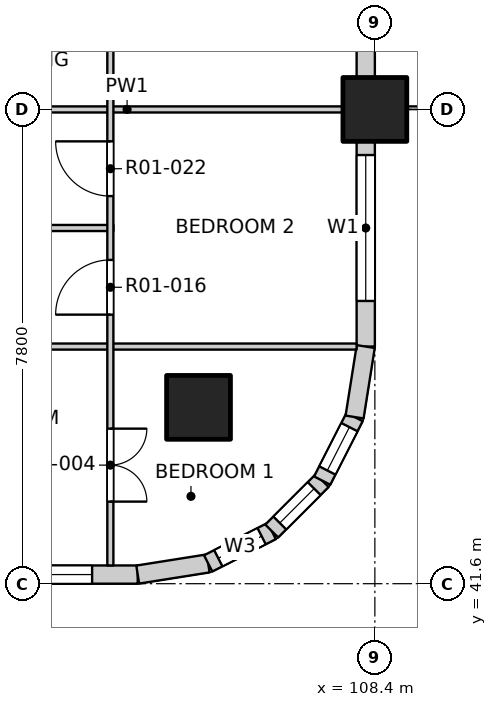
"""IFC4 building model, lengths in metres.
Left out: names, types, materials, properties, quantities, classifications, styles, units other than length and angle.
Written with IfcOpenShell. Run it as: python <this file> out.ifc"""

import sys

from ifc_helpers import new_model, si_unit, direction, frame, frame_2d, origin, origin_2d, place, context, subcontext, project, spatial, rectangle, extrude, element, fill, save


model = new_model("IFC4")
c1 = context("Model", 3, precision=1e-05, world=origin(), true_north=direction((0.0, 1.0)))
c2 = subcontext(c1, "Body", "Model", "MODEL_VIEW")
j1 = project(units=[si_unit("LENGTHUNIT", "METRE"), si_unit("PLANEANGLEUNIT", "RADIAN")], contexts=[c1])
p1 = place(None, origin())
s1 = spatial("IfcSite", under=j1, at=p1, CompositionType="ELEMENT")
p2 = place(p1, origin())
s2 = spatial("IfcBuilding", under=s1, at=p2, CompositionType="ELEMENT")
p3 = place(p2, frame((0.0, 0.0, 26.3)))
s3 = spatial("IfcBuildingStorey", under=s2, at=p3, CompositionType="ELEMENT", Elevation=26.3)
for number, where, z_axis, x_axis in (
    (1, (105.5, 44.5, -0.25), (0.0, 0.0, 1.0), (1.0, 0.0, 0.0)),
    (2, (108.4, 49.4, -0.25), (0.0, 0.0, 1.0), (1.0, 0.0, 0.0)),
):
    element("IfcColumn", number, at=place(p3, frame(where, z_axis=z_axis, x_axis=x_axis)), inside=s3, PredefinedType="COLUMN", context=c2, shape_type="SweptSolid", body=[
        extrude(rectangle(XDim=1.05, YDim=1.05, at=origin_2d()), origin(), (0.0, 0.0, 1.0), 3.4),
    ])
p4 = place(p3, frame((101.125, 41.75, 0.0), z_axis=(0.0, 0.0, 1.0), x_axis=(1.0, 0.0, 0.0)))
e3 = element("IfcWall", 3, at=p4, inside=s3, PredefinedType="SOLIDWALL", context=c2, shape_type="SweptSolid", body=[
    extrude(rectangle(XDim=3.375, YDim=0.3, at=frame_2d((1.688, 0.0))), origin(), (0.0, 0.0, 1.0), 2.7),
])
p5 = place(p4, frame((0.225, 0.0, 0.9)))
e4 = element("IfcOpeningElement", 4, at=p5, cuts=e3, PredefinedType="OPENING", context=c2, shape_type="SweptSolid", body=[
    extrude(rectangle(XDim=2.4, YDim=1.8, at=frame_2d((1.2, 0.9))), frame((0.0, 0.16, 0.0), z_axis=(0.0, -1.0, 0.0), x_axis=(1.0, 0.0, 0.0)), (0.0, 0.0, 1.0), 0.32),
])
p6 = place(p3, frame((108.25, 45.5, 0.0), z_axis=(0.0, 0.0, 1.0), x_axis=(0.0, 1.0, 0.0)))
e5 = element("IfcWall", 5, at=p6, inside=s3, PredefinedType="SOLIDWALL", context=c2, shape_type="SweptSolid", body=[
    extrude(rectangle(XDim=3.375, YDim=0.3, at=frame_2d((1.688, 0.0))), origin(), (0.0, 0.0, 1.0), 2.7),
])
p7 = place(p6, frame((0.75, 0.0, 0.9)))
e6 = element("IfcOpeningElement", 6, at=p7, cuts=e5, PredefinedType="OPENING", context=c2, shape_type="SweptSolid", body=[
    extrude(rectangle(XDim=2.4, YDim=1.8, at=frame_2d((1.2, 0.9))), frame((0.0, 0.16, 0.0), z_axis=(0.0, -1.0, 0.0), x_axis=(1.0, 0.0, 0.0)), (0.0, 0.0, 1.0), 0.32),
])
p8 = place(p3, frame((108.25, 49.925, 0.0), z_axis=(0.0, 0.0, 1.0), x_axis=(0.0, 1.0, 0.0)))
e7 = element("IfcWall", 7, at=p8, inside=s3, PredefinedType="SOLIDWALL", context=c2, shape_type="SweptSolid", body=[
    extrude(rectangle(XDim=6.75, YDim=0.3, at=frame_2d((3.375, 0.0))), origin(), (0.0, 0.0, 1.0), 2.7),
])
p9 = place(p8, frame((0.525, 0.0, 0.0)))
e8 = element("IfcOpeningElement", 8, at=p9, cuts=e7, PredefinedType="OPENING", context=c2, shape_type="SweptSolid", body=[
    extrude(rectangle(XDim=1.8, YDim=2.4, at=frame_2d((0.9, 1.2))), frame((0.0, 0.16, 0.0), z_axis=(0.0, -1.0, 0.0), x_axis=(1.0, 0.0, 0.0)), (0.0, 0.0, 1.0), 0.32),
])
p10 = place(p8, frame((4.125, 0.0, 0.9)))
e9 = element("IfcOpeningElement", 9, at=p10, cuts=e7, PredefinedType="OPENING", context=c2, shape_type="SweptSolid", body=[
    extrude(rectangle(XDim=2.4, YDim=1.8, at=frame_2d((1.2, 0.9))), frame((0.0, 0.16, 0.0), z_axis=(0.0, -1.0, 0.0), x_axis=(1.0, 0.0, 0.0)), (0.0, 0.0, 1.0), 0.32),
])
p11 = place(p3, frame((104.5, 41.75, 0.0), z_axis=(0.0, 0.0, 1.0), x_axis=(0.987678452879, 0.156496880861, 0.0)))
e10 = element("IfcWall", 10, at=p11, inside=s3, PredefinedType="SOLIDWALL", context=c2, shape_type="SweptSolid", body=[
    extrude(rectangle(XDim=1.173, YDim=0.3, at=frame_2d((0.586, 0.0))), origin(), (0.0, 0.0, 1.0), 2.7),
])
p12 = place(p3, frame((105.659, 41.934, 0.0), z_axis=(0.0, 0.0, 1.0), x_axis=(0.890988677504, 0.454025524128, 0.0)))
e11 = element("IfcWall", 11, at=p12, inside=s3, PredefinedType="SOLIDWALL", context=c2, shape_type="SweptSolid", body=[
    extrude(rectangle(XDim=1.173, YDim=0.3, at=frame_2d((0.587, 0.0))), origin(), (0.0, 0.0, 1.0), 2.7),
])
p13 = place(p12, frame((0.187, 0.0, 0.9)))
e12 = element("IfcOpeningElement", 12, at=p13, cuts=e11, PredefinedType="OPENING", context=c2, shape_type="SweptSolid", body=[
    extrude(rectangle(XDim=0.8, YDim=1.2, at=frame_2d((0.4, 0.6))), frame((0.0, 0.16, 0.0), z_axis=(0.0, -1.0, 0.0), x_axis=(1.0, 0.0, 0.0)), (0.0, 0.0, 1.0), 0.32),
])
p14 = place(p3, frame((106.704, 42.466, 0.0), z_axis=(0.0, 0.0, 1.0), x_axis=(0.707106781187, 0.707106781187, 0.0)))
e13 = element("IfcWall", 13, at=p14, inside=s3, PredefinedType="SOLIDWALL", context=c2, shape_type="SweptSolid", body=[
    extrude(rectangle(XDim=1.173, YDim=0.3, at=frame_2d((0.586, 0.0))), origin(), (0.0, 0.0, 1.0), 2.7),
])
p15 = place(p14, frame((0.187, 0.0, 0.9)))
e14 = element("IfcOpeningElement", 14, at=p15, cuts=e13, PredefinedType="OPENING", context=c2, shape_type="SweptSolid", body=[
    extrude(rectangle(XDim=0.8, YDim=1.2, at=frame_2d((0.4, 0.6))), frame((0.0, 0.16, 0.0), z_axis=(0.0, -1.0, 0.0), x_axis=(1.0, 0.0, 0.0)), (0.0, 0.0, 1.0), 0.32),
])
p16 = place(p3, frame((107.534, 43.296, 0.0), z_axis=(0.0, 0.0, 1.0), x_axis=(0.454025524128, 0.890988677504, 0.0)))
e15 = element("IfcWall", 15, at=p16, inside=s3, PredefinedType="SOLIDWALL", context=c2, shape_type="SweptSolid", body=[
    extrude(rectangle(XDim=1.173, YDim=0.3, at=frame_2d((0.587, 0.0))), origin(), (0.0, 0.0, 1.0), 2.7),
])
p17 = place(p16, frame((0.187, 0.0, 0.9)))
e16 = element("IfcOpeningElement", 16, at=p17, cuts=e15, PredefinedType="OPENING", context=c2, shape_type="SweptSolid", body=[
    extrude(rectangle(XDim=0.8, YDim=1.2, at=frame_2d((0.4, 0.6))), frame((0.0, 0.16, 0.0), z_axis=(0.0, -1.0, 0.0), x_axis=(1.0, 0.0, 0.0)), (0.0, 0.0, 1.0), 0.32),
])
p18 = place(p3, frame((108.066, 44.341, 0.0), z_axis=(0.0, 0.0, 1.0), x_axis=(0.156496880861, 0.987678452879, 0.0)))
e17 = element("IfcWall", 17, at=p18, inside=s3, PredefinedType="SOLIDWALL", context=c2, shape_type="SweptSolid", body=[
    extrude(rectangle(XDim=1.173, YDim=0.3, at=frame_2d((0.586, 0.0))), origin(), (0.0, 0.0, 1.0), 2.7),
])
p19 = place(p3, frame((96.6, 45.5, 0.0), z_axis=(0.0, 0.0, 1.0), x_axis=(1.0, 0.0, 0.0)))
e18 = element("IfcWall", 18, at=p19, inside=s3, PredefinedType="PARTITIONING", context=c2, shape_type="SweptSolid", body=[
    extrude(rectangle(XDim=11.5, YDim=0.1, at=frame_2d((5.75, 0.0))), origin(), (0.0, 0.0, 1.0), 3.15),
])
p20 = place(p19, frame((2.635, 0.0, 0.0)))
e19 = element("IfcOpeningElement", 19, at=p20, cuts=e18, PredefinedType="OPENING", context=c2, shape_type="SweptSolid", body=[
    extrude(rectangle(XDim=0.9, YDim=2.1, at=frame_2d((0.45, 1.05))), frame((0.0, 0.06, 0.0), z_axis=(0.0, -1.0, 0.0), x_axis=(1.0, 0.0, 0.0)), (0.0, 0.0, 1.0), 0.12),
])
p21 = place(p3, frame((100.55, 47.45, 0.0), z_axis=(0.0, 0.0, 1.0), x_axis=(1.0, 0.0, 0.0)))
e20 = element("IfcWall", 20, at=p21, inside=s3, PredefinedType="PARTITIONING", context=c2, shape_type="SweptSolid", body=[
    extrude(rectangle(XDim=3.55, YDim=0.1, at=frame_2d((1.775, 0.0))), origin(), (0.0, 0.0, 1.0), 3.15),
])
p22 = place(p3, frame((100.55, 49.4, 0.0), z_axis=(0.0, 0.0, 1.0), x_axis=(1.0, 0.0, 0.0)))
e21 = element("IfcWall", 21, at=p22, inside=s3, PredefinedType="PARTITIONING", context=c2, shape_type="SweptSolid", body=[
    extrude(rectangle(XDim=7.55, YDim=0.1, at=frame_2d((3.775, 0.0))), origin(), (0.0, 0.0, 1.0), 2.55),
])
p23 = place(p3, frame((104.05, 41.9, 0.0), z_axis=(0.0, 0.0, 1.0), x_axis=(0.0, 1.0, 0.0)))
e22 = element("IfcWall", 22, at=p23, inside=s3, PredefinedType="PARTITIONING", context=c2, shape_type="SweptSolid", body=[
    extrude(rectangle(XDim=19.1, YDim=0.1, at=frame_2d((9.55, 0.0))), origin(), (0.0, 0.0, 1.0), 3.15),
])
p24 = place(p23, frame((1.05, 0.0, 0.0)))
e23 = element("IfcOpeningElement", 23, at=p24, cuts=e22, PredefinedType="OPENING", context=c2, shape_type="SweptSolid", body=[
    extrude(rectangle(XDim=1.2, YDim=2.1, at=frame_2d((0.6, 1.05))), frame((0.0, 0.06, 0.0), z_axis=(0.0, -1.0, 0.0), x_axis=(1.0, 0.0, 0.0)), (0.0, 0.0, 1.0), 0.12),
])
p25 = place(p23, frame((4.125, 0.0, 0.0)))
e24 = element("IfcOpeningElement", 24, at=p25, cuts=e22, PredefinedType="OPENING", context=c2, shape_type="SweptSolid", body=[
    extrude(rectangle(XDim=0.9, YDim=2.1, at=frame_2d((0.45, 1.05))), frame((0.0, 0.06, 0.0), z_axis=(0.0, -1.0, 0.0), x_axis=(1.0, 0.0, 0.0)), (0.0, 0.0, 1.0), 0.12),
])
p26 = place(p23, frame((6.075, 0.0, 0.0)))
e25 = element("IfcOpeningElement", 25, at=p26, cuts=e22, PredefinedType="OPENING", context=c2, shape_type="SweptSolid", body=[
    extrude(rectangle(XDim=0.9, YDim=2.1, at=frame_2d((0.45, 1.05))), frame((0.0, 0.06, 0.0), z_axis=(0.0, -1.0, 0.0), x_axis=(1.0, 0.0, 0.0)), (0.0, 0.0, 1.0), 0.12),
])
p27 = place(p23, frame((8.85, 0.0, 0.0)))
e26 = element("IfcOpeningElement", 26, at=p27, cuts=e22, PredefinedType="OPENING", context=c2, shape_type="SweptSolid", body=[
    extrude(rectangle(XDim=1.2, YDim=2.1, at=frame_2d((0.6, 1.05))), frame((0.0, 0.06, 0.0), z_axis=(0.0, -1.0, 0.0), x_axis=(1.0, 0.0, 0.0)), (0.0, 0.0, 1.0), 0.12),
])
p28 = place(p23, frame((12.75, 0.0, 0.0)))
e27 = element("IfcOpeningElement", 27, at=p28, cuts=e22, PredefinedType="OPENING", context=c2, shape_type="SweptSolid", body=[
    extrude(rectangle(XDim=1.2, YDim=2.1, at=frame_2d((0.6, 1.05))), frame((0.0, 0.06, 0.0), z_axis=(0.0, -1.0, 0.0), x_axis=(1.0, 0.0, 0.0)), (0.0, 0.0, 1.0), 0.12),
])
p29 = place(p23, frame((15.825, 0.0, 0.0)))
e28 = element("IfcOpeningElement", 28, at=p29, cuts=e22, PredefinedType="OPENING", context=c2, shape_type="SweptSolid", body=[
    extrude(rectangle(XDim=0.9, YDim=2.1, at=frame_2d((0.45, 1.05))), frame((0.0, 0.06, 0.0), z_axis=(0.0, -1.0, 0.0), x_axis=(1.0, 0.0, 0.0)), (0.0, 0.0, 1.0), 0.12),
])
p30 = place(p23, frame((17.775, 0.0, 0.0)))
e29 = element("IfcOpeningElement", 29, at=p30, cuts=e22, PredefinedType="OPENING", context=c2, shape_type="SweptSolid", body=[
    extrude(rectangle(XDim=0.9, YDim=2.1, at=frame_2d((0.45, 1.05))), frame((0.0, 0.06, 0.0), z_axis=(0.0, -1.0, 0.0), x_axis=(1.0, 0.0, 0.0)), (0.0, 0.0, 1.0), 0.12),
])
p31 = place(p5, origin())
e30 = element("IfcWindow", 30, at=p31, inside=s3, PartitioningType="DOUBLE_PANEL_VERTICAL", PredefinedType="WINDOW", context=c2, shape_type="SweptSolid", body=[
    extrude(rectangle(XDim=2.4, YDim=1.8, at=frame_2d((1.2, 0.9))), frame((0.0, 0.03, 0.0), z_axis=(0.0, -1.0, 0.0), x_axis=(1.0, 0.0, 0.0)), (0.0, 0.0, 1.0), 0.06),
])
fill(e4, e30)
p32 = place(p7, origin())
e31 = element("IfcWindow", 31, at=p32, inside=s3, PartitioningType="DOUBLE_PANEL_VERTICAL", PredefinedType="WINDOW", context=c2, shape_type="SweptSolid", body=[
    extrude(rectangle(XDim=2.4, YDim=1.8, at=frame_2d((1.2, 0.9))), frame((0.0, 0.03, 0.0), z_axis=(0.0, -1.0, 0.0), x_axis=(1.0, 0.0, 0.0)), (0.0, 0.0, 1.0), 0.06),
])
fill(e6, e31)
p33 = place(p13, origin())
e32 = element("IfcWindow", 32, at=p33, inside=s3, PartitioningType="SINGLE_PANEL", PredefinedType="WINDOW", context=c2, shape_type="SweptSolid", body=[
    extrude(rectangle(XDim=0.8, YDim=1.2, at=frame_2d((0.4, 0.6))), frame((0.0, 0.03, 0.0), z_axis=(0.0, -1.0, 0.0), x_axis=(1.0, 0.0, 0.0)), (0.0, 0.0, 1.0), 0.06),
])
fill(e12, e32)
p34 = place(p15, origin())
e33 = element("IfcWindow", 33, at=p34, inside=s3, PartitioningType="SINGLE_PANEL", PredefinedType="WINDOW", context=c2, shape_type="SweptSolid", body=[
    extrude(rectangle(XDim=0.8, YDim=1.2, at=frame_2d((0.4, 0.6))), frame((0.0, 0.03, 0.0), z_axis=(0.0, -1.0, 0.0), x_axis=(1.0, 0.0, 0.0)), (0.0, 0.0, 1.0), 0.06),
])
fill(e14, e33)
p35 = place(p17, origin())
e34 = element("IfcWindow", 34, at=p35, inside=s3, PartitioningType="SINGLE_PANEL", PredefinedType="WINDOW", context=c2, shape_type="SweptSolid", body=[
    extrude(rectangle(XDim=0.8, YDim=1.2, at=frame_2d((0.4, 0.6))), frame((0.0, 0.03, 0.0), z_axis=(0.0, -1.0, 0.0), x_axis=(1.0, 0.0, 0.0)), (0.0, 0.0, 1.0), 0.06),
])
fill(e16, e34)
p36 = place(p24, origin())
e35 = element("IfcDoor", 35, at=p36, inside=s3, OperationType="DOUBLE_DOOR_SINGLE_SWING", PredefinedType="DOOR", context=c2, shape_type="SweptSolid", body=[
    extrude(rectangle(XDim=1.2, YDim=2.1, at=frame_2d((0.6, 1.05))), frame((0.0, 0.025, 0.0), z_axis=(0.0, -1.0, 0.0), x_axis=(1.0, 0.0, 0.0)), (0.0, 0.0, 1.0), 0.05),
])
fill(e23, e35)
p37 = place(p25, origin())
e36 = element("IfcDoor", 36, at=p37, inside=s3, OperationType="SINGLE_SWING_LEFT", PredefinedType="DOOR", context=c2, shape_type="SweptSolid", body=[
    extrude(rectangle(XDim=0.9, YDim=2.1, at=frame_2d((0.45, 1.05))), frame((0.0, 0.025, 0.0), z_axis=(0.0, -1.0, 0.0), x_axis=(1.0, 0.0, 0.0)), (0.0, 0.0, 1.0), 0.05),
])
fill(e24, e36)
p38 = place(p26, origin())
e37 = element("IfcDoor", 37, at=p38, inside=s3, OperationType="SINGLE_SWING_RIGHT", PredefinedType="DOOR", context=c2, shape_type="SweptSolid", body=[
    extrude(rectangle(XDim=0.9, YDim=2.1, at=frame_2d((0.45, 1.05))), frame((0.0, 0.025, 0.0), z_axis=(0.0, -1.0, 0.0), x_axis=(1.0, 0.0, 0.0)), (0.0, 0.0, 1.0), 0.05),
])
fill(e25, e37)
save(model, sys.argv[1])
